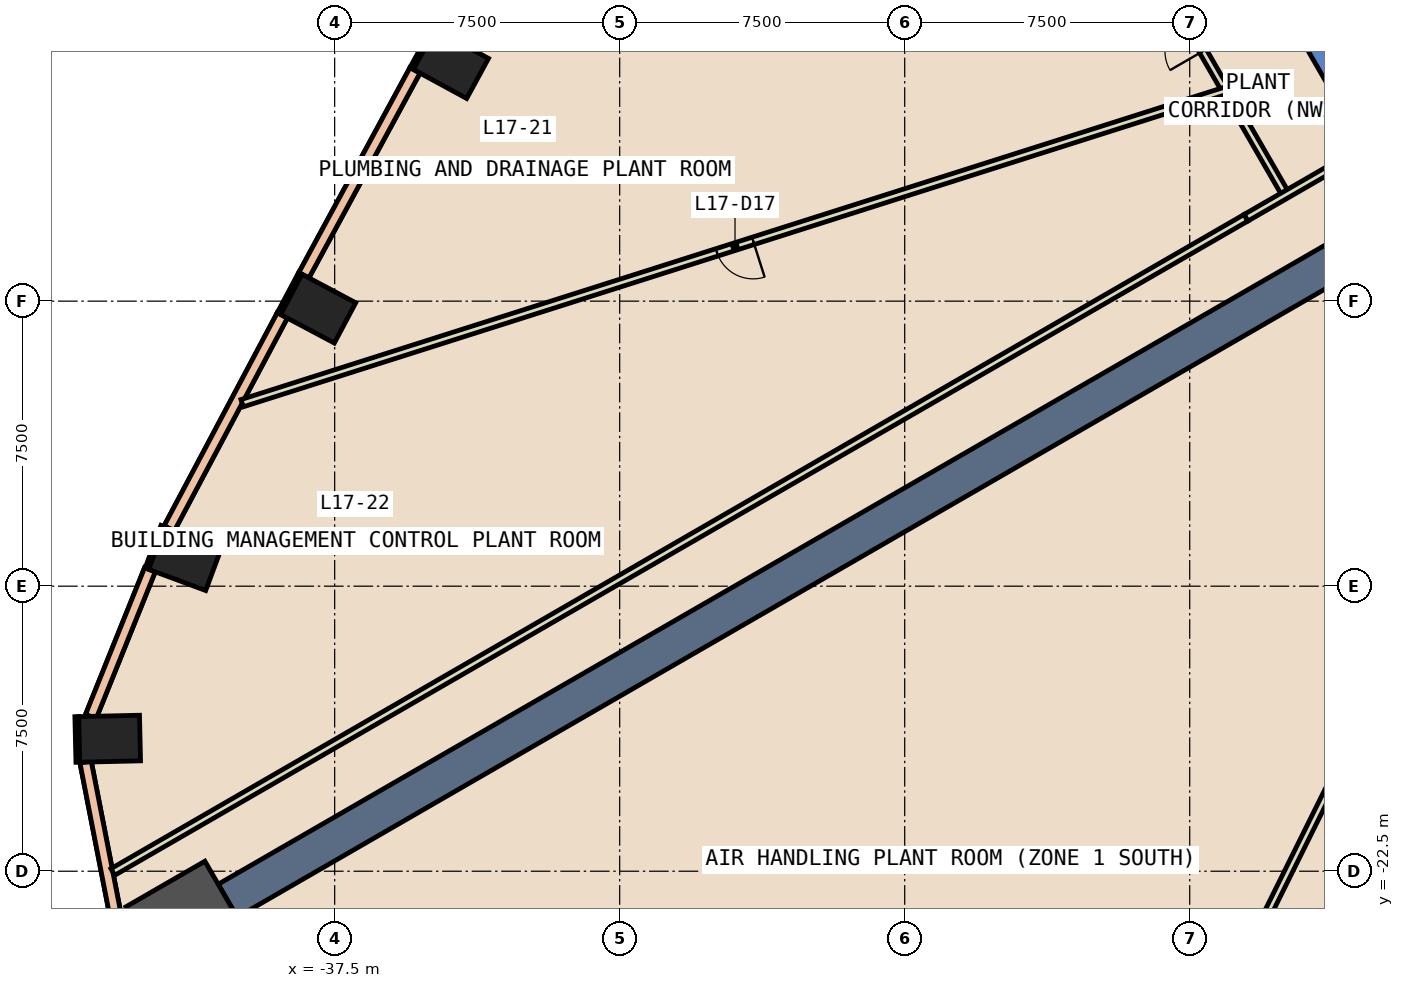
"""IFC4 building model, lengths in metres.
Left out: names, types, materials, properties, quantities, classifications, styles, units other than length and angle.
Written with IfcOpenShell. Run it as: python <this file> out.ifc"""

import sys

from ifc_helpers import new_model, si_unit, direction, frame, frame_2d, origin, origin_2d, place, context, subcontext, project, spatial, polyline, rectangle, outline, extrude, element, fill, save


model = new_model("IFC4")
c1 = context("Model", 3, precision=1e-05, world=origin(), true_north=direction((0.0, 1.0)))
c2 = subcontext(c1, "Body", "Model", "MODEL_VIEW")
j1 = project(units=[si_unit("LENGTHUNIT", "METRE"), si_unit("PLANEANGLEUNIT", "RADIAN")], contexts=[c1])
p1 = place(None, origin())
s1 = spatial("IfcSite", under=j1, at=p1, CompositionType="ELEMENT")
p2 = place(p1, origin())
s2 = spatial("IfcBuilding", under=s1, at=p2, CompositionType="ELEMENT")
p3 = place(p2, frame((0.0, 0.0, 81.2)))
s3 = spatial("IfcBuildingStorey", under=s2, at=p3, CompositionType="ELEMENT", Elevation=81.2)
for number, where, z_axis, x_axis in (
    (1, (-34.442, -1.258, -0.6), (0.0, 0.0, 1.0), (0.478, 0.878, 0.0)),
    (2, (-37.934, -7.697, -0.6), (0.0, 0.0, 1.0), (0.469, 0.883, 0.0)),
    (3, (-41.435, -14.273, -0.6), (0.0, 0.0, 1.0), (0.348, 0.937, 0.0)),
    (4, (-43.422, -19.014, -0.6), (0.0, 0.0, 1.0), (-0.023, 1.0, 0.0)),
):
    element("IfcColumn", number, at=place(p3, frame(where, z_axis=z_axis, x_axis=x_axis)), inside=s3, PredefinedType="COLUMN", context=c2, shape_type="SweptSolid", body=[
        extrude(rectangle(XDim=1.2, YDim=1.6, at=origin_2d()), origin(), (0.0, 0.0, 1.0), 5.4),
    ])
p4 = place(p3, frame((-41.354, -23.876, -0.6), z_axis=(0.0, 0.0, 1.0), x_axis=(0.866025403784, 0.5, 0.0)))
e5 = element("IfcColumn", 5, at=p4, inside=s3, PredefinedType="COLUMN", context=c2, shape_type="SweptSolid", body=[
    extrude(rectangle(XDim=2.4, YDim=2.4, at=origin_2d()), origin(), (0.0, 0.0, 1.0), 5.4),
])
p5 = place(p3, frame((0.0, 0.0, -0.6)))
e6 = element("IfcWall", 6, at=p5, inside=s3, PredefinedType="SHEAR", context=c2, shape_type="SweptSolid", body=[
    extrude(outline(polyline([(-13.856, 2.5), (-6.928, -9.5), (-6.409, -8.6), (-12.817, 2.5), (-13.856, 2.5)])), origin(), (0.0, 0.0, 1.0), 5.4),
])
p6 = place(p3, frame((-9.31, -5.375, 0.0), z_axis=(0.0, 0.0, 1.0), x_axis=(-0.866022967049, -0.500004220526, 0.0)))
e7 = element("IfcWall", 7, at=p6, inside=s3, PredefinedType="SHEAR", context=c2, shape_type="SweptSolid", body=[
    extrude(rectangle(XDim=35.802, YDim=1.0, at=frame_2d((17.901, 0.0))), origin(), (0.0, 0.0, 1.0), 4.8),
])
p7 = place(p3, frame((-34.901, -0.325, 0.0), z_axis=(0.0, 0.0, 1.0), x_axis=(-0.478424520456, -0.878128679765, 0.0)))
e8 = element("IfcWall", 8, at=p7, inside=s3, PredefinedType="STANDARD", context=c2, shape_type="SweptSolid", body=[
    extrude(rectangle(XDim=1.2, YDim=0.1, at=frame_2d((0.6, 0.0))), origin(), (0.0, 0.0, 1.0), 4.8),
])
p8 = place(p3, frame((-38.403, -6.769, 0.0), z_axis=(0.0, 0.0, 1.0), x_axis=(-0.469467784567, -0.882949601763, 0.0)))
e9 = element("IfcWall", 9, at=p8, inside=s3, PredefinedType="STANDARD", context=c2, shape_type="SweptSolid", body=[
    extrude(rectangle(XDim=1.199, YDim=0.1, at=frame_2d((0.6, 0.0))), origin(), (0.0, 0.0, 1.0), 4.8),
])
for number, where, z_axis, x_axis in (
    (10, (-42.023, -13.415, 0.0), (0.0, 0.0, 1.0), (-0.348, -0.937, 0.0)),
    (11, (-44.286, -18.433, 0.0), (0.0, 0.0, 1.0), (0.023, -1.0, 0.0)),
):
    element("IfcWall", number, at=place(p3, frame(where, z_axis=z_axis, x_axis=x_axis)), inside=s3, PredefinedType="STANDARD", context=c2, shape_type="SweptSolid", body=[
        extrude(rectangle(XDim=1.2, YDim=0.1, at=frame_2d((0.6, 0.0))), origin(), (0.0, 0.0, 1.0), 4.8),
    ])
p9 = place(p3, frame((-35.386, -1.426, 0.0), z_axis=(0.0, 0.0, 1.0), x_axis=(-0.476762519224, -0.879032138356, 0.0)))
e12 = element("IfcWall", 12, at=p9, inside=s3, PredefinedType="STANDARD", context=c2, shape_type="SweptSolid", body=[
    extrude(rectangle(XDim=6.135, YDim=0.3, at=frame_2d((3.068, 0.0))), origin(), (0.0, 0.0, 1.0), 1.2),
])
p10 = place(p3, frame((-35.386, -1.426, 4.0), z_axis=(0.0, 0.0, 1.0), x_axis=(-0.476762519224, -0.879032138356, 0.0)))
e13 = element("IfcWall", 13, at=p10, inside=s3, PredefinedType="STANDARD", context=c2, shape_type="SweptSolid", body=[
    extrude(rectangle(XDim=6.135, YDim=0.3, at=frame_2d((3.068, 0.0))), origin(), (0.0, 0.0, 1.0), 0.8),
])
p11 = place(p3, frame((-38.877, -7.874, 0.0), z_axis=(0.0, 0.0, 1.0), x_axis=(-0.469082096551, -0.883154565575, 0.0)))
e14 = element("IfcWall", 14, at=p11, inside=s3, PredefinedType="STANDARD", context=c2, shape_type="SweptSolid", body=[
    extrude(rectangle(XDim=6.346, YDim=0.3, at=frame_2d((3.173, 0.0))), origin(), (0.0, 0.0, 1.0), 1.2),
])
p12 = place(p3, frame((-38.877, -7.874, 4.0), z_axis=(0.0, 0.0, 1.0), x_axis=(-0.469082096551, -0.883154565575, 0.0)))
e15 = element("IfcWall", 15, at=p12, inside=s3, PredefinedType="STANDARD", context=c2, shape_type="SweptSolid", body=[
    extrude(rectangle(XDim=6.346, YDim=0.3, at=frame_2d((3.173, 0.0))), origin(), (0.0, 0.0, 1.0), 0.8),
])
p13 = place(p3, frame((-42.362, -14.568, 0.0), z_axis=(0.0, 0.0, 1.0), x_axis=(-0.373424226069, -0.92766068548, 0.0)))
e16 = element("IfcWall", 16, at=p13, inside=s3, PredefinedType="STANDARD", context=c2, shape_type="SweptSolid", body=[
    extrude(rectangle(XDim=4.159, YDim=0.3, at=frame_2d((2.079, 0.0))), origin(), (0.0, 0.0, 1.0), 1.2),
])
p14 = place(p3, frame((-42.362, -14.568, 4.0), z_axis=(0.0, 0.0, 1.0), x_axis=(-0.373424226069, -0.92766068548, 0.0)))
e17 = element("IfcWall", 17, at=p14, inside=s3, PredefinedType="STANDARD", context=c2, shape_type="SweptSolid", body=[
    extrude(rectangle(XDim=4.159, YDim=0.3, at=frame_2d((2.079, 0.0))), origin(), (0.0, 0.0, 1.0), 0.8),
])
p15 = place(p3, frame((-44.054, -19.627, 0.0), z_axis=(0.0, 0.0, 1.0), x_axis=(0.191384281913, -0.981515184109, 0.0)))
e18 = element("IfcWall", 18, at=p15, inside=s3, PredefinedType="STANDARD", context=c2, shape_type="SweptSolid", body=[
    extrude(rectangle(XDim=4.368, YDim=0.3, at=frame_2d((2.184, 0.0))), origin(), (0.0, 0.0, 1.0), 1.2),
])
p16 = place(p3, frame((-44.054, -19.627, 4.0), z_axis=(0.0, 0.0, 1.0), x_axis=(0.191384281913, -0.981515184109, 0.0)))
e19 = element("IfcWall", 19, at=p16, inside=s3, PredefinedType="STANDARD", context=c2, shape_type="SweptSolid", body=[
    extrude(rectangle(XDim=4.368, YDim=0.3, at=frame_2d((2.184, 0.0))), origin(), (0.0, 0.0, 1.0), 0.8),
])
p17 = place(p3, frame((-43.337, -22.52, 0.0), z_axis=(0.0, 0.0, 1.0), x_axis=(0.866035864772, 0.4999818806, 0.0)))
e20 = element("IfcWall", 20, at=p17, inside=s3, PredefinedType="PARTITIONING", context=c2, shape_type="SweptSolid", body=[
    extrude(rectangle(XDim=34.431, YDim=0.2, at=frame_2d((17.216, 0.0))), origin(), (0.0, 0.0, 1.0), 4.8),
])
p18 = place(p3, frame((-12.471, -4.7, 0.0), z_axis=(0.0, 0.0, 1.0), x_axis=(-0.49990916997, 0.866077838176, 0.0)))
e21 = element("IfcWall", 21, at=p18, inside=s3, PredefinedType="PARTITIONING", context=c2, shape_type="SweptSolid", body=[
    extrude(rectangle(XDim=8.414, YDim=0.2, at=frame_2d((4.207, 0.0))), origin(), (0.0, 0.0, 1.0), 4.8),
])
p19 = place(p18, frame((4.362, 0.0, 0.0)))
e22 = element("IfcOpeningElement", 22, at=p19, cuts=e21, PredefinedType="OPENING", context=c2, shape_type="SweptSolid", body=[
    extrude(rectangle(XDim=1.0, YDim=2.1, at=frame_2d((0.5, 1.05))), frame((0.0, 0.11, 0.0), z_axis=(0.0, -1.0, 0.0), x_axis=(1.0, 0.0, 0.0)), (0.0, 0.0, 1.0), 0.22),
])
p20 = place(p3, frame((-14.051, -1.963, 0.0), z_axis=(0.0, 0.0, 1.0), x_axis=(-0.953071002878, -0.302746863687, 0.0)))
e23 = element("IfcWall", 23, at=p20, inside=s3, PredefinedType="PARTITIONING", context=c2, shape_type="SweptSolid", body=[
    extrude(rectangle(XDim=27.158, YDim=0.2, at=frame_2d((13.579, 0.0))), origin(), (0.0, 0.0, 1.0), 4.8),
])
p21 = place(p20, frame((13.05, 0.0, 0.0)))
e24 = element("IfcOpeningElement", 24, at=p21, cuts=e23, PredefinedType="OPENING", context=c2, shape_type="SweptSolid", body=[
    extrude(rectangle(XDim=1.0, YDim=2.1, at=frame_2d((0.5, 1.05))), frame((0.0, 0.11, 0.0), z_axis=(0.0, -1.0, 0.0), x_axis=(1.0, 0.0, 0.0)), (0.0, 0.0, 1.0), 0.22),
])
p22 = place(p3, frame((-8.37, -14.378, 0.0), z_axis=(0.0, 0.0, 1.0), x_axis=(-0.444267350834, -0.895894257702, 0.0)))
e25 = element("IfcWall", 25, at=p22, inside=s3, PredefinedType="PARTITIONING", context=c2, shape_type="SweptSolid", body=[
    extrude(rectangle(XDim=16.222, YDim=0.2, at=frame_2d((8.111, 0.0))), origin(), (0.0, 0.0, 1.0), 4.8),
])
p23 = place(p3, frame((-10.659, -3.654, 0.0), z_axis=(0.0, 0.0, 1.0), x_axis=(-0.866004557827, -0.500036104519, 0.0)))
e26 = element("IfcWall", 26, at=p23, inside=s3, PredefinedType="PARTITIONING", context=c2, shape_type="SweptSolid", body=[
    extrude(rectangle(XDim=3.302, YDim=0.2, at=frame_2d((1.651, 0.0))), origin(), (0.0, 0.0, 1.0), 4.8),
])
p24 = place(p21, origin())
e27 = element("IfcDoor", 27, at=p24, inside=s3, OperationType="SINGLE_SWING_LEFT", PredefinedType="DOOR", context=c2, shape_type="SweptSolid", body=[
    extrude(rectangle(XDim=1.0, YDim=2.1, at=frame_2d((0.5, 1.05))), frame((0.0, 0.025, 0.0), z_axis=(0.0, -1.0, 0.0), x_axis=(1.0, 0.0, 0.0)), (0.0, 0.0, 1.0), 0.05),
])
fill(e24, e27)
save(model, sys.argv[1])
